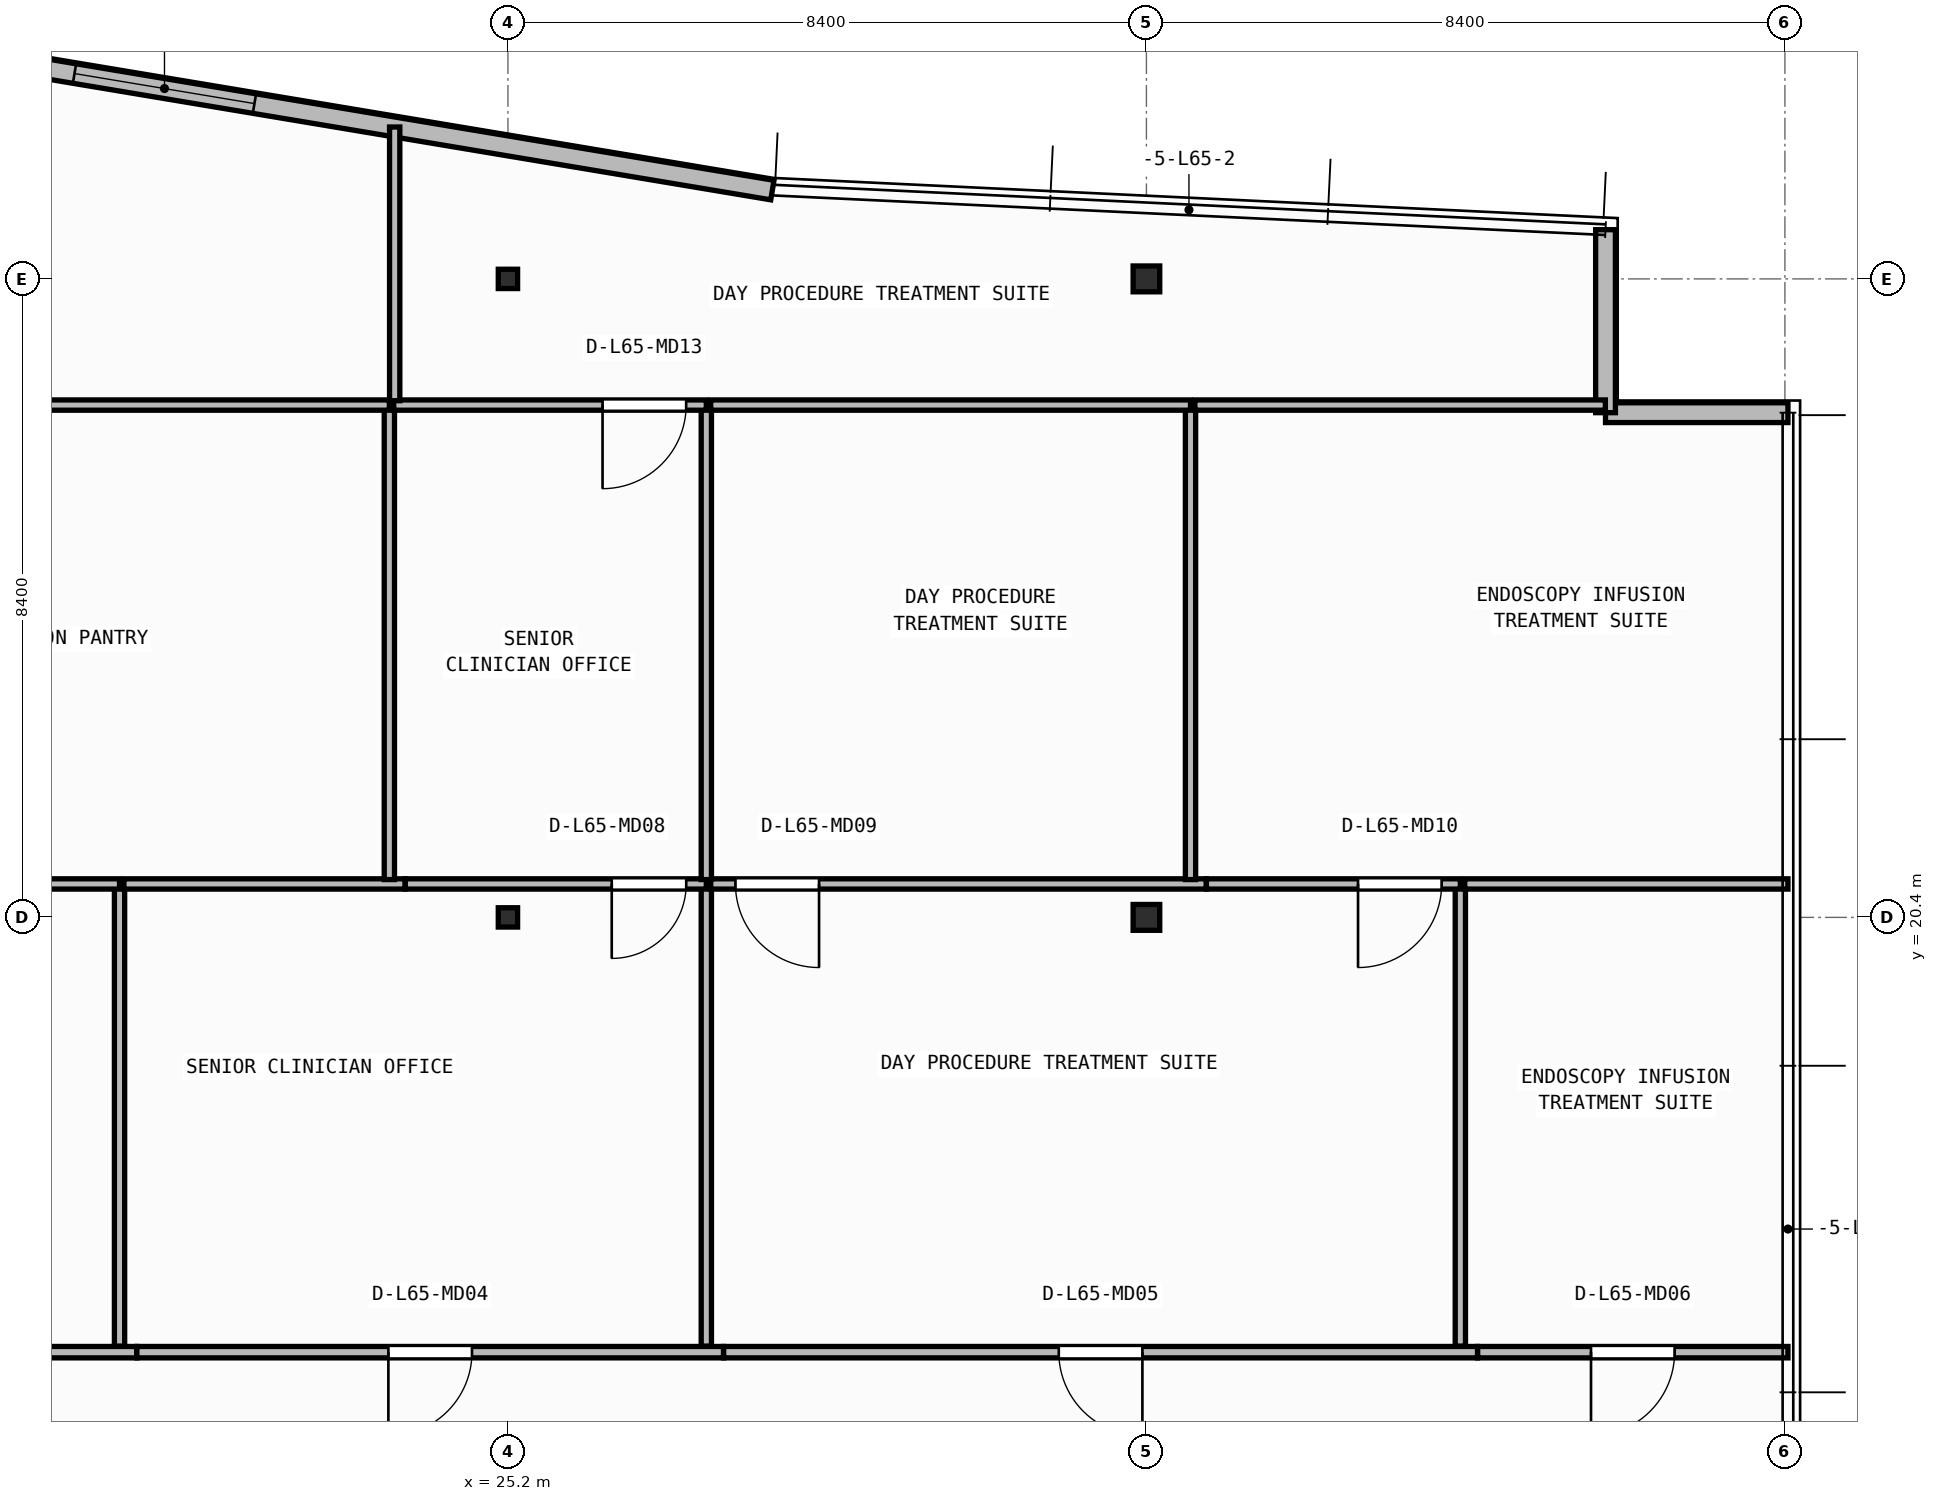
"""IFC4 building model, lengths in metres.
Left out: names, types, materials, properties, quantities, classifications, styles, units other than length and angle.
Written with IfcOpenShell. Run it as: python <this file> out.ifc"""

import sys

from ifc_helpers import new_model, si_unit, direction, frame, frame_2d, origin, origin_2d, place, context, subcontext, project, spatial, rectangle, i_section, extrude, element, fill, save


model = new_model("IFC4")
c1 = context("Model", 3, precision=1e-05, world=origin(), true_north=direction((0.0, 1.0)))
c2 = subcontext(c1, "Body", "Model", "MODEL_VIEW")
j1 = project(units=[si_unit("LENGTHUNIT", "METRE"), si_unit("PLANEANGLEUNIT", "RADIAN")], contexts=[c1])
p1 = place(None, origin())
s1 = spatial("IfcSite", under=j1, at=p1, CompositionType="ELEMENT")
p2 = place(p1, origin())
s2 = spatial("IfcBuilding", under=s1, at=p2, CompositionType="ELEMENT")
p3 = place(p2, frame((0.0, 0.0, 264.45)))
s3 = spatial("IfcBuildingStorey", under=s2, at=p3, CompositionType="ELEMENT", Elevation=264.45)
p4 = place(p3, frame((25.2, 20.4, 0.0), z_axis=(0.0, 0.0, 1.0), x_axis=(1.0, 0.0, 0.0)))
e1 = element("IfcColumn", 1, at=p4, inside=s3, PredefinedType="COLUMN", context=c2, shape_type="SweptSolid", body=[
    extrude(i_section(OverallWidth=0.254, OverallDepth=0.254, WebThickness=0.009, FlangeThickness=0.014, FilletRadius=0.013, at=origin_2d()), origin(), (0.0, 0.0, 1.0), 3.95),
])
p5 = place(p3, frame((33.6, 20.4, 0.0), z_axis=(0.0, 0.0, 1.0), x_axis=(1.0, 0.0, 0.0)))
e2 = element("IfcColumn", 2, at=p5, inside=s3, PredefinedType="COLUMN", context=c2, shape_type="SweptSolid", body=[
    extrude(i_section(OverallWidth=0.35, OverallDepth=0.34, WebThickness=0.016, FlangeThickness=0.028, at=origin_2d()), origin(), (0.0, 0.0, 1.0), 3.95),
])
p6 = place(p3, frame((25.2, 28.8, 0.0), z_axis=(0.0, 0.0, 1.0), x_axis=(1.0, 0.0, 0.0)))
e3 = element("IfcColumn", 3, at=p6, inside=s3, PredefinedType="COLUMN", context=c2, shape_type="SweptSolid", body=[
    extrude(i_section(OverallWidth=0.254, OverallDepth=0.254, WebThickness=0.009, FlangeThickness=0.014, FilletRadius=0.013, at=origin_2d()), origin(), (0.0, 0.0, 1.0), 3.95),
])
p7 = place(p3, frame((33.6, 28.8, 0.0), z_axis=(0.0, 0.0, 1.0), x_axis=(1.0, 0.0, 0.0)))
e4 = element("IfcColumn", 4, at=p7, inside=s3, PredefinedType="COLUMN", context=c2, shape_type="SweptSolid", body=[
    extrude(i_section(OverallWidth=0.35, OverallDepth=0.34, WebThickness=0.016, FlangeThickness=0.028, at=origin_2d()), origin(), (0.0, 0.0, 1.0), 3.95),
])
p8 = place(p3, frame((42.04, 27.04, 0.0), z_axis=(0.0, 0.0, 1.0), x_axis=(-1.0, 0.0, 0.0)))
e5 = element("IfcWall", 5, at=p8, inside=s3, PredefinedType="STANDARD", context=c2, shape_type="SweptSolid", body=[
    extrude(rectangle(XDim=2.4, YDim=0.26, at=frame_2d((1.2, 0.0))), origin(), (0.0, 0.0, 1.0), 3.71),
])
p9 = place(p3, frame((39.64, 27.04, 0.0), z_axis=(0.0, 0.0, 1.0), x_axis=(0.0, 1.0, 0.0)))
e6 = element("IfcWall", 6, at=p9, inside=s3, PredefinedType="STANDARD", context=c2, shape_type="SweptSolid", body=[
    extrude(rectangle(XDim=2.407, YDim=0.26, at=frame_2d((1.204, 0.0))), origin(), (0.0, 0.0, 1.0), 3.71),
])
p10 = place(p3, frame((28.679, 29.969, 0.0), z_axis=(0.0, 0.0, 1.0), x_axis=(-0.986343023061, 0.164704100918, 0.0)))
e7 = element("IfcWall", 7, at=p10, inside=s3, PredefinedType="STANDARD", context=c2, shape_type="SweptSolid", body=[
    extrude(rectangle(XDim=11.159, YDim=0.26, at=frame_2d((5.579, 0.0))), origin(), (0.0, 0.0, 1.0), 3.71),
])
p11 = place(p10, frame((6.908, 0.0, 0.9)))
e8 = element("IfcOpeningElement", 8, at=p11, cuts=e7, PredefinedType="OPENING", context=c2, shape_type="SweptSolid", body=[
    extrude(rectangle(XDim=2.4, YDim=1.65, at=frame_2d((1.2, 0.825))), frame((0.0, 0.14, 0.0), z_axis=(0.0, -1.0, 0.0), x_axis=(1.0, 0.0, 0.0)), (0.0, 0.0, 1.0), 0.28),
])
p12 = place(p3, frame((20.316, 14.68, 0.0), z_axis=(0.0, 0.0, 1.0), x_axis=(-1.0, 0.0, 0.0)))
e9 = element("IfcWall", 9, at=p12, inside=s3, PredefinedType="PARTITIONING", context=c2, shape_type="SweptSolid", body=[
    extrude(rectangle(XDim=6.762, YDim=0.15, at=frame_2d((3.381, 0.0))), origin(), (0.0, 0.0, 1.0), 3.71),
])
p13 = place(p12, frame((2.831, 0.0, 0.0)))
e10 = element("IfcOpeningElement", 10, at=p13, cuts=e9, PredefinedType="OPENING", context=c2, shape_type="SweptSolid", body=[
    extrude(rectangle(XDim=1.1, YDim=2.1, at=frame_2d((0.55, 1.05))), frame((0.0, 0.085, 0.0), z_axis=(0.0, -1.0, 0.0), x_axis=(1.0, 0.0, 0.0)), (0.0, 0.0, 1.0), 0.17),
])
p14 = place(p3, frame((28.036, 14.68, 0.0), z_axis=(0.0, 0.0, 1.0), x_axis=(-1.0, 0.0, 0.0)))
e11 = element("IfcWall", 11, at=p14, inside=s3, PredefinedType="PARTITIONING", context=c2, shape_type="SweptSolid", body=[
    extrude(rectangle(XDim=7.718, YDim=0.15, at=frame_2d((3.859, 0.0))), origin(), (0.0, 0.0, 1.0), 3.71),
])
p15 = place(p14, frame((3.309, 0.0, 0.0)))
e12 = element("IfcOpeningElement", 12, at=p15, cuts=e11, PredefinedType="OPENING", context=c2, shape_type="SweptSolid", body=[
    extrude(rectangle(XDim=1.1, YDim=2.1, at=frame_2d((0.55, 1.05))), frame((0.0, 0.085, 0.0), z_axis=(0.0, -1.0, 0.0), x_axis=(1.0, 0.0, 0.0)), (0.0, 0.0, 1.0), 0.17),
])
p16 = place(p3, frame((37.956, 14.68, 0.0), z_axis=(0.0, 0.0, 1.0), x_axis=(-1.0, 0.0, 0.0)))
e13 = element("IfcWall", 13, at=p16, inside=s3, PredefinedType="PARTITIONING", context=c2, shape_type="SweptSolid", body=[
    extrude(rectangle(XDim=9.918, YDim=0.15, at=frame_2d((4.959, 0.0))), origin(), (0.0, 0.0, 1.0), 3.71),
])
p17 = place(p16, frame((4.409, 0.0, 0.0)))
e14 = element("IfcOpeningElement", 14, at=p17, cuts=e13, PredefinedType="OPENING", context=c2, shape_type="SweptSolid", body=[
    extrude(rectangle(XDim=1.1, YDim=2.1, at=frame_2d((0.55, 1.05))), frame((0.0, 0.085, 0.0), z_axis=(0.0, -1.0, 0.0), x_axis=(1.0, 0.0, 0.0)), (0.0, 0.0, 1.0), 0.17),
])
p18 = place(p3, frame((42.04, 14.68, 0.0), z_axis=(0.0, 0.0, 1.0), x_axis=(-1.0, 0.0, 0.0)))
e15 = element("IfcWall", 15, at=p18, inside=s3, PredefinedType="PARTITIONING", context=c2, shape_type="SweptSolid", body=[
    extrude(rectangle(XDim=4.082, YDim=0.15, at=frame_2d((2.041, 0.0))), origin(), (0.0, 0.0, 1.0), 3.71),
])
p19 = place(p18, frame((1.491, 0.0, 0.0)))
e16 = element("IfcOpeningElement", 16, at=p19, cuts=e15, PredefinedType="OPENING", context=c2, shape_type="SweptSolid", body=[
    extrude(rectangle(XDim=1.1, YDim=2.1, at=frame_2d((0.55, 1.05))), frame((0.0, 0.085, 0.0), z_axis=(0.0, -1.0, 0.0), x_axis=(1.0, 0.0, 0.0)), (0.0, 0.0, 1.0), 0.17),
])
p20 = place(p3, frame((20.09, 14.76, 0.0), z_axis=(0.0, 0.0, 1.0), x_axis=(0.0, 1.0, 0.0)))
e17 = element("IfcWall", 17, at=p20, inside=s3, PredefinedType="PARTITIONING", context=c2, shape_type="SweptSolid", body=[
    extrude(rectangle(XDim=6.08, YDim=0.135, at=frame_2d((3.04, 0.0))), origin(), (0.0, 0.0, 1.0), 3.71),
])
p21 = place(p3, frame((20.09, 20.84, 0.0), z_axis=(0.0, 0.0, 1.0), x_axis=(-1.0, 0.0, 0.0)))
e18 = element("IfcWall", 18, at=p21, inside=s3, PredefinedType="PARTITIONING", context=c2, shape_type="SweptSolid", body=[
    extrude(rectangle(XDim=6.31, YDim=0.135, at=frame_2d((3.155, 0.0))), origin(), (0.0, 0.0, 1.0), 3.157),
])
p22 = place(p3, frame((27.81, 14.76, 0.0), z_axis=(0.0, 0.0, 1.0), x_axis=(0.0, 1.0, 0.0)))
e19 = element("IfcWall", 19, at=p22, inside=s3, PredefinedType="PARTITIONING", context=c2, shape_type="SweptSolid", body=[
    extrude(rectangle(XDim=6.08, YDim=0.135, at=frame_2d((3.04, 0.0))), origin(), (0.0, 0.0, 1.0), 3.71),
])
p23 = place(p3, frame((23.847, 20.84, 0.0), z_axis=(0.0, 0.0, 1.0), x_axis=(-1.0, 0.0, 0.0)))
e20 = element("IfcWall", 20, at=p23, inside=s3, PredefinedType="PARTITIONING", context=c2, shape_type="SweptSolid", body=[
    extrude(rectangle(XDim=3.7, YDim=0.135, at=frame_2d((1.85, 0.0))), origin(), (0.0, 0.0, 1.0), 3.157),
])
p24 = place(p3, frame((27.81, 20.84, 0.0), z_axis=(0.0, 0.0, 1.0), x_axis=(-1.0, 0.0, 0.0)))
e21 = element("IfcWall", 21, at=p24, inside=s3, PredefinedType="PARTITIONING", context=c2, shape_type="SweptSolid", body=[
    extrude(rectangle(XDim=3.96, YDim=0.135, at=frame_2d((1.98, 0.0))), origin(), (0.0, 0.0, 1.0), 3.157),
])
p25 = place(p24, frame((0.264, 0.0, 0.0)))
e22 = element("IfcOpeningElement", 22, at=p25, cuts=e21, PredefinedType="OPENING", context=c2, shape_type="SweptSolid", body=[
    extrude(rectangle(XDim=0.98, YDim=2.1, at=frame_2d((0.49, 1.05))), frame((0.0, 0.077, 0.0), z_axis=(0.0, -1.0, 0.0), x_axis=(1.0, 0.0, 0.0)), (0.0, 0.0, 1.0), 0.155),
])
p26 = place(p3, frame((37.73, 14.76, 0.0), z_axis=(0.0, 0.0, 1.0), x_axis=(0.0, 1.0, 0.0)))
e23 = element("IfcWall", 23, at=p26, inside=s3, PredefinedType="PARTITIONING", context=c2, shape_type="SweptSolid", body=[
    extrude(rectangle(XDim=6.08, YDim=0.135, at=frame_2d((3.04, 0.0))), origin(), (0.0, 0.0, 1.0), 3.71),
])
p27 = place(p3, frame((34.387, 20.84, 0.0), z_axis=(0.0, 0.0, 1.0), x_axis=(-1.0, 0.0, 0.0)))
e24 = element("IfcWall", 24, at=p27, inside=s3, PredefinedType="PARTITIONING", context=c2, shape_type="SweptSolid", body=[
    extrude(rectangle(XDim=6.52, YDim=0.135, at=frame_2d((3.26, 0.0))), origin(), (0.0, 0.0, 1.0), 3.157),
])
p28 = place(p27, frame((5.094, 0.0, 0.0)))
e25 = element("IfcOpeningElement", 25, at=p28, cuts=e24, PredefinedType="OPENING", context=c2, shape_type="SweptSolid", body=[
    extrude(rectangle(XDim=1.1, YDim=2.1, at=frame_2d((0.55, 1.05))), frame((0.0, 0.077, 0.0), z_axis=(0.0, -1.0, 0.0), x_axis=(1.0, 0.0, 0.0)), (0.0, 0.0, 1.0), 0.155),
])
p29 = place(p3, frame((37.73, 20.84, 0.0), z_axis=(0.0, 0.0, 1.0), x_axis=(-1.0, 0.0, 0.0)))
e26 = element("IfcWall", 26, at=p29, inside=s3, PredefinedType="PARTITIONING", context=c2, shape_type="SweptSolid", body=[
    extrude(rectangle(XDim=3.341, YDim=0.135, at=frame_2d((1.67, 0.0))), origin(), (0.0, 0.0, 1.0), 3.71),
])
p30 = place(p29, frame((0.246, 0.0, 0.0)))
e27 = element("IfcOpeningElement", 27, at=p30, cuts=e26, PredefinedType="OPENING", context=c2, shape_type="SweptSolid", body=[
    extrude(rectangle(XDim=1.1, YDim=2.1, at=frame_2d((0.55, 1.05))), frame((0.0, 0.077, 0.0), z_axis=(0.0, -1.0, 0.0), x_axis=(1.0, 0.0, 0.0)), (0.0, 0.0, 1.0), 0.155),
])
p31 = place(p3, frame((42.04, 20.84, 0.0), z_axis=(0.0, 0.0, 1.0), x_axis=(-1.0, 0.0, 0.0)))
e28 = element("IfcWall", 28, at=p31, inside=s3, PredefinedType="PARTITIONING", context=c2, shape_type="SweptSolid", body=[
    extrude(rectangle(XDim=4.252, YDim=0.135, at=frame_2d((2.126, 0.0))), origin(), (0.0, 0.0, 1.0), 3.71),
])
p32 = place(p3, frame((23.64, 20.897, 0.0), z_axis=(0.0, 0.0, 1.0), x_axis=(0.0, 1.0, 0.0)))
e29 = element("IfcWall", 29, at=p32, inside=s3, PredefinedType="PARTITIONING", context=c2, shape_type="SweptSolid", body=[
    extrude(rectangle(XDim=6.242, YDim=0.135, at=frame_2d((3.121, 0.0))), origin(), (0.0, 0.0, 1.0), 3.71),
])
p33 = place(p3, frame((23.64, 27.14, 0.0), z_axis=(0.0, 0.0, 1.0), x_axis=(-1.0, 0.0, 0.0)))
e30 = element("IfcWall", 30, at=p33, inside=s3, PredefinedType="PARTITIONING", context=c2, shape_type="SweptSolid", body=[
    extrude(rectangle(XDim=9.86, YDim=0.135, at=frame_2d((4.93, 0.0))), origin(), (0.0, 0.0, 1.0), 3.71),
])
p34 = place(p3, frame((27.81, 20.897, 0.0), z_axis=(0.0, 0.0, 1.0), x_axis=(0.0, 1.0, 0.0)))
e31 = element("IfcWall", 31, at=p34, inside=s3, PredefinedType="PARTITIONING", context=c2, shape_type="SweptSolid", body=[
    extrude(rectangle(XDim=6.242, YDim=0.135, at=frame_2d((3.121, 0.0))), origin(), (0.0, 0.0, 1.0), 3.71),
])
p35 = place(p3, frame((27.81, 27.14, 0.0), z_axis=(0.0, 0.0, 1.0), x_axis=(-1.0, 0.0, 0.0)))
e32 = element("IfcWall", 32, at=p35, inside=s3, PredefinedType="PARTITIONING", context=c2, shape_type="SweptSolid", body=[
    extrude(rectangle(XDim=4.113, YDim=0.135, at=frame_2d((2.056, 0.0))), origin(), (0.0, 0.0, 1.0), 3.71),
])
p36 = place(p35, frame((0.265, 0.0, 0.0)))
e33 = element("IfcOpeningElement", 33, at=p36, cuts=e32, PredefinedType="OPENING", context=c2, shape_type="SweptSolid", body=[
    extrude(rectangle(XDim=1.1, YDim=2.1, at=frame_2d((0.55, 1.05))), frame((0.0, 0.077, 0.0), z_axis=(0.0, -1.0, 0.0), x_axis=(1.0, 0.0, 0.0)), (0.0, 0.0, 1.0), 0.155),
])
p37 = place(p3, frame((34.18, 20.897, 0.0), z_axis=(0.0, 0.0, 1.0), x_axis=(0.0, 1.0, 0.0)))
e34 = element("IfcWall", 34, at=p37, inside=s3, PredefinedType="PARTITIONING", context=c2, shape_type="SweptSolid", body=[
    extrude(rectangle(XDim=6.242, YDim=0.135, at=frame_2d((3.121, 0.0))), origin(), (0.0, 0.0, 1.0), 3.71),
])
p38 = place(p3, frame((34.18, 27.14, 0.0), z_axis=(0.0, 0.0, 1.0), x_axis=(-1.0, 0.0, 0.0)))
e35 = element("IfcWall", 35, at=p38, inside=s3, PredefinedType="PARTITIONING", context=c2, shape_type="SweptSolid", body=[
    extrude(rectangle(XDim=6.312, YDim=0.135, at=frame_2d((3.156, 0.0))), origin(), (0.0, 0.0, 1.0), 3.71),
])
p39 = place(p3, frame((39.638, 27.14, 0.0), z_axis=(0.0, 0.0, 1.0), x_axis=(-1.0, 0.0, 0.0)))
e36 = element("IfcWall", 36, at=p39, inside=s3, PredefinedType="PARTITIONING", context=c2, shape_type="SweptSolid", body=[
    extrude(rectangle(XDim=5.4, YDim=0.135, at=frame_2d((2.7, 0.0))), origin(), (0.0, 0.0, 1.0), 3.71),
])
p40 = place(p3, frame((23.71, 27.198, 0.0), z_axis=(0.0, 0.0, 1.0), x_axis=(0.0, 1.0, 0.0)))
e37 = element("IfcWall", 37, at=p40, inside=s3, PredefinedType="PARTITIONING", context=c2, shape_type="SweptSolid", body=[
    extrude(rectangle(XDim=3.601, YDim=0.135, at=frame_2d((1.8, 0.0))), origin(), (0.0, 0.0, 1.0), 3.71),
])
p41 = place(p11, origin())
e38 = element("IfcWindow", 38, at=p41, inside=s3, PartitioningType="SINGLE_PANEL", PredefinedType="WINDOW", context=c2, shape_type="SweptSolid", body=[
    extrude(rectangle(XDim=2.4, YDim=1.65, at=frame_2d((1.2, 0.825))), frame((0.0, 0.03, 0.0), z_axis=(0.0, -1.0, 0.0), x_axis=(1.0, 0.0, 0.0)), (0.0, 0.0, 1.0), 0.06),
])
fill(e8, e38)
p42 = place(p15, origin())
e39 = element("IfcDoor", 39, at=p42, inside=s3, OperationType="SINGLE_SWING_RIGHT", PredefinedType="DOOR", context=c2, shape_type="SweptSolid", body=[
    extrude(rectangle(XDim=1.1, YDim=2.1, at=frame_2d((0.55, 1.05))), frame((0.0, 0.025, 0.0), z_axis=(0.0, -1.0, 0.0), x_axis=(1.0, 0.0, 0.0)), (0.0, 0.0, 1.0), 0.05),
])
fill(e12, e39)
p43 = place(p17, origin())
e40 = element("IfcDoor", 40, at=p43, inside=s3, OperationType="SINGLE_SWING_LEFT", PredefinedType="DOOR", context=c2, shape_type="SweptSolid", body=[
    extrude(rectangle(XDim=1.1, YDim=2.1, at=frame_2d((0.55, 1.05))), frame((0.0, 0.025, 0.0), z_axis=(0.0, -1.0, 0.0), x_axis=(1.0, 0.0, 0.0)), (0.0, 0.0, 1.0), 0.05),
])
fill(e14, e40)
p44 = place(p19, origin())
e41 = element("IfcDoor", 41, at=p44, inside=s3, OperationType="SINGLE_SWING_RIGHT", PredefinedType="DOOR", context=c2, shape_type="SweptSolid", body=[
    extrude(rectangle(XDim=1.1, YDim=2.1, at=frame_2d((0.55, 1.05))), frame((0.0, 0.025, 0.0), z_axis=(0.0, -1.0, 0.0), x_axis=(1.0, 0.0, 0.0)), (0.0, 0.0, 1.0), 0.05),
])
fill(e16, e41)
p45 = place(p25, origin())
e42 = element("IfcDoor", 42, at=p45, inside=s3, OperationType="SINGLE_SWING_RIGHT", PredefinedType="DOOR", context=c2, shape_type="SweptSolid", body=[
    extrude(rectangle(XDim=0.98, YDim=2.1, at=frame_2d((0.49, 1.05))), frame((0.0, 0.025, 0.0), z_axis=(0.0, -1.0, 0.0), x_axis=(1.0, 0.0, 0.0)), (0.0, 0.0, 1.0), 0.05),
])
fill(e22, e42)
p46 = place(p28, origin())
e43 = element("IfcDoor", 43, at=p46, inside=s3, OperationType="SINGLE_SWING_LEFT", PredefinedType="DOOR", context=c2, shape_type="SweptSolid", body=[
    extrude(rectangle(XDim=1.1, YDim=2.1, at=frame_2d((0.55, 1.05))), frame((0.0, 0.025, 0.0), z_axis=(0.0, -1.0, 0.0), x_axis=(1.0, 0.0, 0.0)), (0.0, 0.0, 1.0), 0.05),
])
fill(e25, e43)
p47 = place(p30, origin())
e44 = element("IfcDoor", 44, at=p47, inside=s3, OperationType="SINGLE_SWING_RIGHT", PredefinedType="DOOR", context=c2, shape_type="SweptSolid", body=[
    extrude(rectangle(XDim=1.1, YDim=2.1, at=frame_2d((0.55, 1.05))), frame((0.0, 0.025, 0.0), z_axis=(0.0, -1.0, 0.0), x_axis=(1.0, 0.0, 0.0)), (0.0, 0.0, 1.0), 0.05),
])
fill(e27, e44)
p48 = place(p36, origin())
e45 = element("IfcDoor", 45, at=p48, inside=s3, OperationType="SINGLE_SWING_RIGHT", PredefinedType="DOOR", context=c2, shape_type="SweptSolid", body=[
    extrude(rectangle(XDim=1.1, YDim=2.1, at=frame_2d((0.55, 1.05))), frame((0.0, 0.025, 0.0), z_axis=(0.0, -1.0, 0.0), x_axis=(1.0, 0.0, 0.0)), (0.0, 0.0, 1.0), 0.05),
])
fill(e33, e45)
save(model, sys.argv[1])
